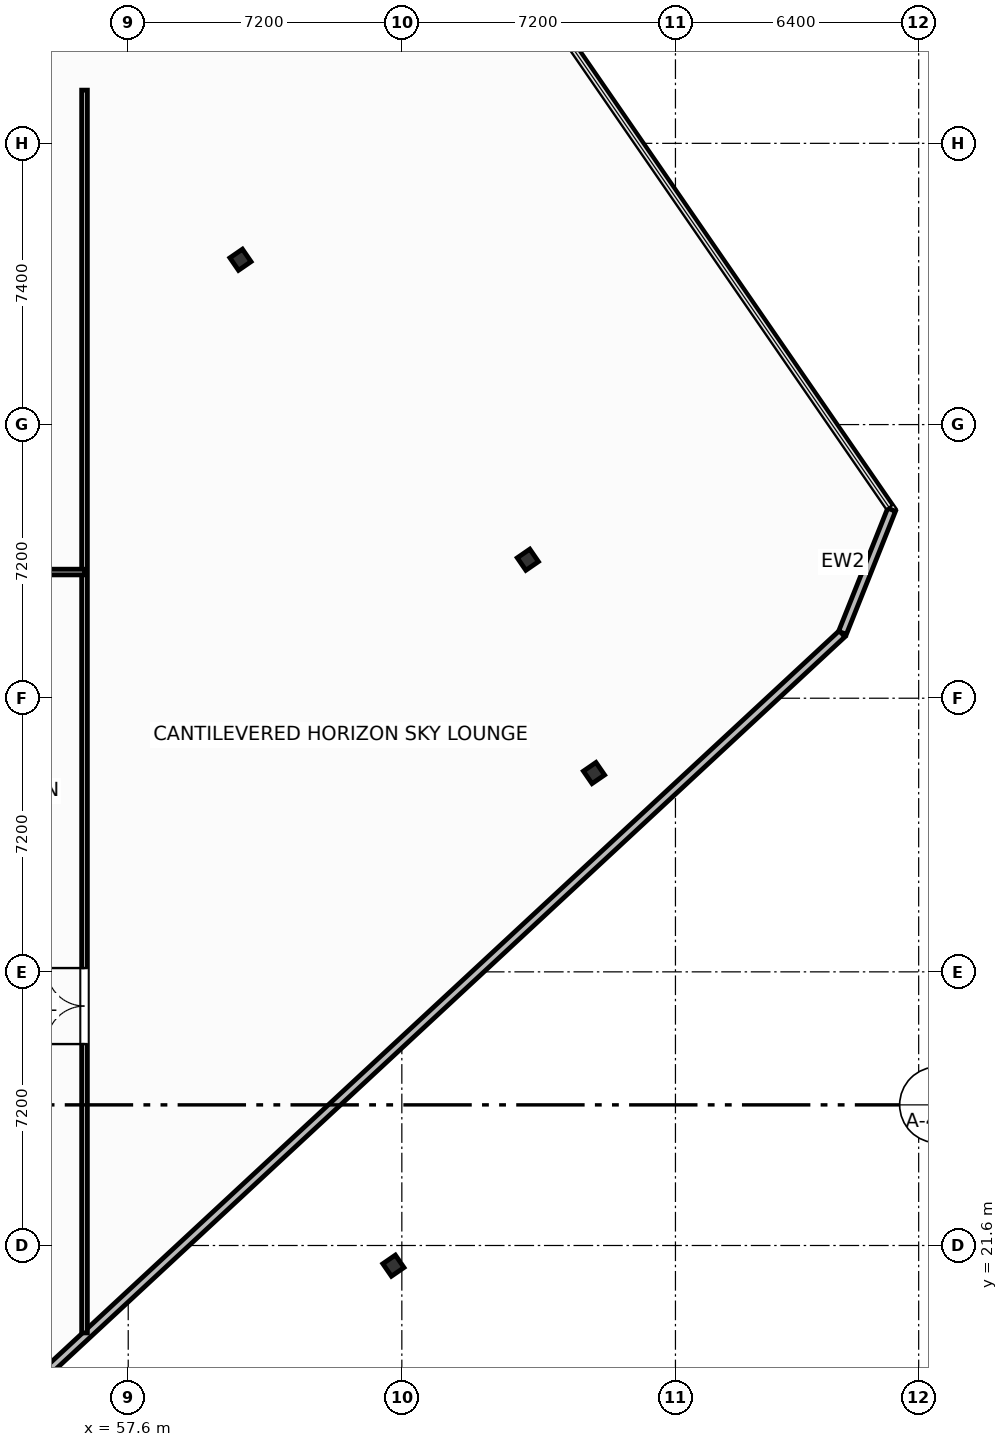
"""IFC4 building model, lengths in metres.
Left out: names, types, materials, properties, quantities, classifications, styles, units other than length and angle.
Written with IfcOpenShell. Run it as: python <this file> out.ifc"""

import sys

from ifc_helpers import new_model, si_unit, direction, frame, frame_2d, origin, origin_2d, place, context, subcontext, project, spatial, rectangle, i_section, extrude, element, fill, save


model = new_model("IFC4")
c1 = context("Model", 3, precision=1e-05, world=origin(), true_north=direction((0.0, 1.0)))
c2 = subcontext(c1, "Body", "Model", "MODEL_VIEW")
j1 = project(units=[si_unit("LENGTHUNIT", "METRE"), si_unit("PLANEANGLEUNIT", "RADIAN")], contexts=[c1])
p1 = place(None, origin())
s1 = spatial("IfcSite", under=j1, at=p1, CompositionType="ELEMENT")
p2 = place(p1, origin())
s2 = spatial("IfcBuilding", under=s1, at=p2, CompositionType="ELEMENT")
p3 = place(p2, frame((0.0, 0.0, 291.5)))
s3 = spatial("IfcBuildingStorey", under=s2, at=p3, CompositionType="ELEMENT", Elevation=291.5)
for number, where, z_axis, x_axis in (
    (1, (64.578, 21.07, 0.0), (0.0, 0.0, 1.0), (0.824, 0.567, 0.0)),
    (2, (69.857, 34.031, 0.0), (0.0, 0.0, 1.0), (0.824, 0.567, 0.0)),
    (3, (68.115, 39.644, 0.0), (0.0, 0.0, 1.0), (0.824, 0.567, 0.0)),
    (4, (60.554, 47.537, 0.0), (0.0, 0.0, 1.0), (0.824, 0.567, 0.0)),
):
    element("IfcColumn", number, at=place(p3, frame(where, z_axis=z_axis, x_axis=x_axis)), inside=s3, PredefinedType="COLUMN", context=c2, shape_type="SweptSolid", body=[
        extrude(i_section(OverallWidth=0.401, OverallDepth=0.399, WebThickness=0.025, FlangeThickness=0.04, FilletRadius=0.022, at=origin_2d()), origin(), (0.0, 0.0, 1.0), 4.8),
    ])
p4 = place(p3, frame((27.693, -7.489, 0.0), z_axis=(0.0, 0.0, 1.0), x_axis=(0.733009701217, 0.680218184057, 0.0)))
e5 = element("IfcWall", 5, at=p4, inside=s3, PredefinedType="SOLIDWALL", context=c2, shape_type="SweptSolid", body=[
    extrude(rectangle(XDim=66.428, YDim=0.22, at=frame_2d((33.214, 0.0))), origin(), (0.0, 0.0, 1.0), 2.265),
])
p5 = place(p4, frame((32.014, 0.0, 0.8)))
e6 = element("IfcOpeningElement", 6, at=p5, cuts=e5, PredefinedType="OPENING", context=c2, shape_type="SweptSolid", body=[
    extrude(rectangle(XDim=2.4, YDim=1.385, at=frame_2d((1.2, 0.692))), frame((0.0, 0.12, 0.0), z_axis=(0.0, -1.0, 0.0), x_axis=(1.0, 0.0, 0.0)), (0.0, 0.0, 1.0), 0.24),
])
p6 = place(p3, frame((76.395, 37.72, 0.0), z_axis=(0.0, 0.0, 1.0), x_axis=(0.370546091486, 0.928814079396, 0.0)))
e7 = element("IfcWall", 7, at=p6, inside=s3, PredefinedType="SOLIDWALL", context=c2, shape_type="SweptSolid", body=[
    extrude(rectangle(XDim=3.489, YDim=0.22, at=frame_2d((1.745, 0.0))), origin(), (0.0, 0.0, 1.0), 3.76),
])
p7 = place(p3, frame((56.45, 19.3, 0.0), z_axis=(0.0, 0.0, 1.0), x_axis=(0.0, 1.0, 0.0)))
e8 = element("IfcWall", 8, at=p7, inside=s3, PredefinedType="PARTITIONING", context=c2, shape_type="SweptSolid", body=[
    extrude(rectangle(XDim=32.7, YDim=0.15, at=frame_2d((16.35, 0.0))), origin(), (0.0, 0.0, 1.0), 2.265),
])
p8 = place(p7, frame((7.6, 0.0, 0.0)))
e9 = element("IfcOpeningElement", 9, at=p8, cuts=e8, PredefinedType="OPENING", context=c2, shape_type="SweptSolid", body=[
    extrude(rectangle(XDim=2.0, YDim=2.05, at=frame_2d((1.0, 1.025))), frame((0.0, 0.085, 0.0), z_axis=(0.0, -1.0, 0.0), x_axis=(1.0, 0.0, 0.0)), (0.0, 0.0, 1.0), 0.17),
])
p9 = place(p3, frame((28.0, 39.32, 0.0), z_axis=(0.0, 0.0, 1.0), x_axis=(1.0, 0.0, 0.0)))
e10 = element("IfcWall", 10, at=p9, inside=s3, PredefinedType="PARTITIONING", context=c2, shape_type="SweptSolid", body=[
    extrude(rectangle(XDim=28.45, YDim=0.15, at=frame_2d((14.225, 0.0))), origin(), (0.0, 0.0, 1.0), 4.48),
])
p10 = place(p9, frame((24.6, 0.0, 0.0)))
e11 = element("IfcOpeningElement", 11, at=p10, cuts=e10, PredefinedType="OPENING", context=c2, shape_type="SweptSolid", body=[
    extrude(rectangle(XDim=1.0, YDim=2.05, at=frame_2d((0.5, 1.025))), frame((0.0, 0.085, 0.0), z_axis=(0.0, -1.0, 0.0), x_axis=(1.0, 0.0, 0.0)), (0.0, 0.0, 1.0), 0.17),
])
p11 = place(p8, origin())
e12 = element("IfcDoor", 12, at=p11, inside=s3, OperationType="DOUBLE_DOOR_SINGLE_SWING", PredefinedType="DOOR", context=c2, shape_type="SweptSolid", body=[
    extrude(rectangle(XDim=2.0, YDim=2.05, at=frame_2d((1.0, 1.025))), frame((0.0, 0.025, 0.0), z_axis=(0.0, -1.0, 0.0), x_axis=(1.0, 0.0, 0.0)), (0.0, 0.0, 1.0), 0.05),
])
fill(e9, e12)
save(model, sys.argv[1])
